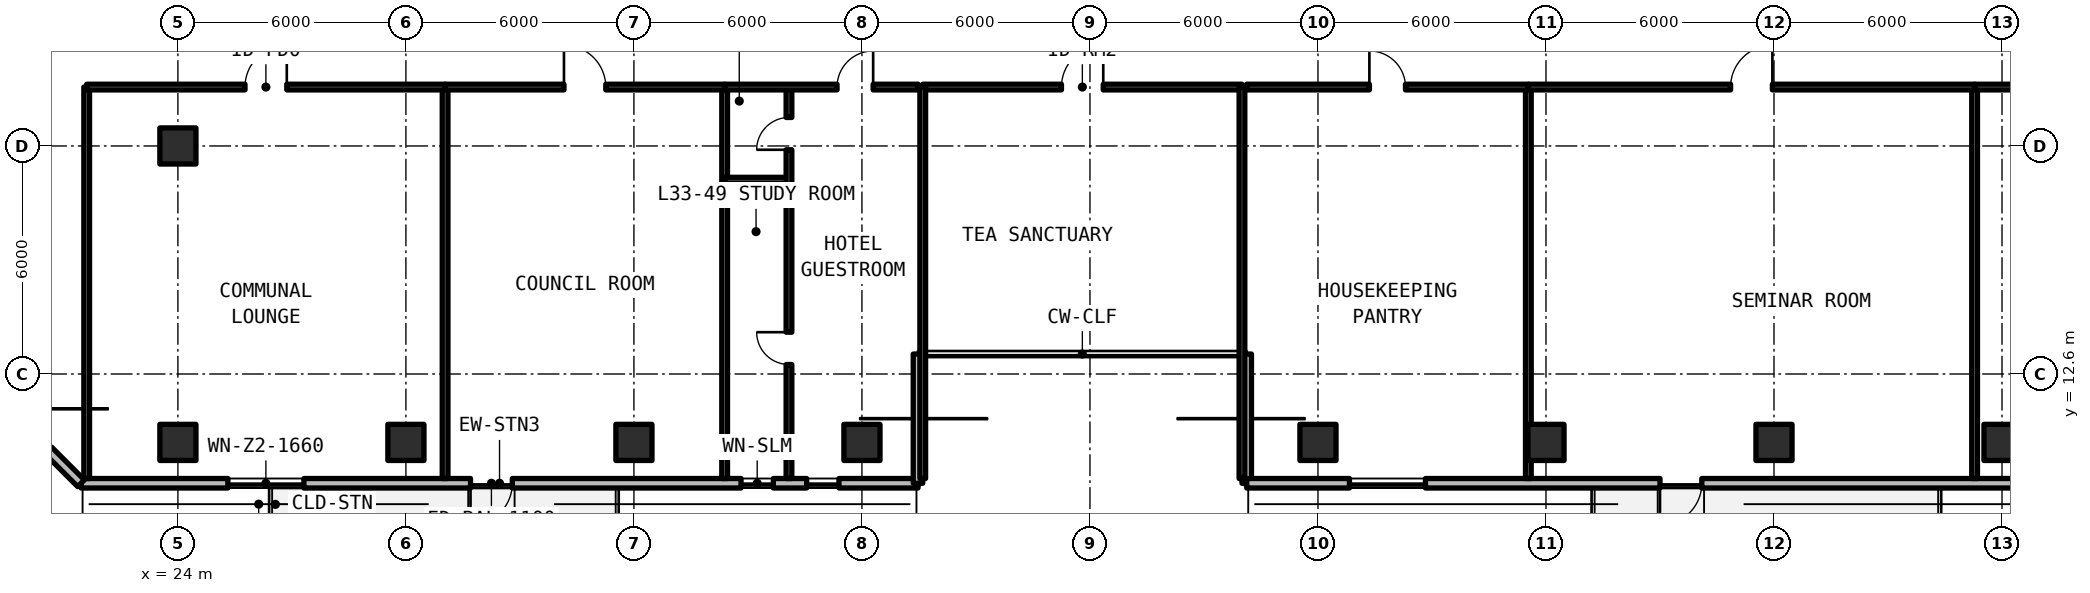
"""IFC4 building model, lengths in metres.
Left out: names, types, materials, properties, quantities, classifications, styles, units other than length and angle.
Written with IfcOpenShell. Run it as: python <this file> out.ifc"""

import sys

from ifc_helpers import new_model, si_unit, direction, frame, frame_2d, origin, origin_2d, place, context, subcontext, project, spatial, rectangle, extrude, element, fill, save


model = new_model("IFC4")
c1 = context("Model", 3, precision=1e-05, world=origin(), true_north=direction((0.0, 1.0)))
c2 = subcontext(c1, "Body", "Model", "MODEL_VIEW")
j1 = project(units=[si_unit("LENGTHUNIT", "METRE"), si_unit("PLANEANGLEUNIT", "RADIAN")], contexts=[c1])
p1 = place(None, origin())
s1 = spatial("IfcSite", under=j1, at=p1, CompositionType="ELEMENT")
p2 = place(p1, origin())
s2 = spatial("IfcBuilding", under=s1, at=p2, CompositionType="ELEMENT")
p3 = place(p2, frame((0.0, 0.0, 119.46)))
s3 = spatial("IfcBuildingStorey", under=s2, at=p3, CompositionType="ELEMENT", Elevation=119.46)
for number, where, z_axis, x_axis in (
    (1, (24.0, 18.6, 0.0), (0.0, 0.0, 1.0), (1.0, 0.0, 0.0)),
    (2, (24.0, 10.8, 0.0), (0.0, 0.0, 1.0), (1.0, 0.0, 0.0)),
    (3, (30.0, 10.8, 0.0), (0.0, 0.0, 1.0), (1.0, 0.0, 0.0)),
    (4, (36.0, 10.8, 0.0), (0.0, 0.0, 1.0), (1.0, 0.0, 0.0)),
    (5, (42.0, 10.8, 0.0), (0.0, 0.0, 1.0), (1.0, 0.0, 0.0)),
    (6, (54.0, 10.8, 0.0), (0.0, 0.0, 1.0), (1.0, 0.0, 0.0)),
    (7, (60.0, 10.8, 0.0), (0.0, 0.0, 1.0), (1.0, 0.0, 0.0)),
    (8, (66.0, 10.8, 0.0), (0.0, 0.0, 1.0), (1.0, 0.0, 0.0)),
    (9, (72.0, 10.8, 0.0), (0.0, 0.0, 1.0), (1.0, 0.0, 0.0)),
):
    element("IfcColumn", number, at=place(p3, frame(where, z_axis=z_axis, x_axis=x_axis)), inside=s3, PredefinedType="COLUMN", context=c2, shape_type="SweptSolid", body=[
        extrude(rectangle(XDim=0.95, YDim=0.95, at=origin_2d()), origin(), (0.0, 0.0, 1.0), 3.63),
    ])
p4 = place(p3, frame((21.452, 9.725, 0.0), z_axis=(0.0, 0.0, 1.0), x_axis=(1.0, 0.0, 0.0)))
e10 = element("IfcWall", 10, at=p4, inside=s3, PredefinedType="SOLIDWALL", context=c2, shape_type="SweptSolid", body=[
    extrude(rectangle(XDim=22.023, YDim=0.25, at=frame_2d((11.012, 0.0))), origin(), (0.0, 0.0, 1.0), 3.35),
])
p5 = place(p4, frame((10.248, 0.0, 0.0)))
e11 = element("IfcOpeningElement", 11, at=p5, cuts=e10, PredefinedType="OPENING", context=c2, shape_type="SweptSolid", body=[
    extrude(rectangle(XDim=1.1, YDim=2.15, at=frame_2d((0.55, 1.075))), frame((0.0, 0.135, 0.0), z_axis=(0.0, -1.0, 0.0), x_axis=(1.0, 0.0, 0.0)), (0.0, 0.0, 1.0), 0.27),
])
p6 = place(p4, frame((3.864, 0.0, 0.78)))
e12 = element("IfcOpeningElement", 12, at=p6, cuts=e10, PredefinedType="OPENING", context=c2, shape_type="SweptSolid", body=[
    extrude(rectangle(XDim=2.0, YDim=1.66, at=frame_2d((1.0, 0.83))), frame((0.0, 0.135, 0.0), z_axis=(0.0, -1.0, 0.0), x_axis=(1.0, 0.0, 0.0)), (0.0, 0.0, 1.0), 0.27),
])
p7 = place(p4, frame((17.367, 0.0, 0.78)))
e13 = element("IfcOpeningElement", 13, at=p7, cuts=e10, PredefinedType="OPENING", context=c2, shape_type="SweptSolid", body=[
    extrude(rectangle(XDim=0.85, YDim=1.65, at=frame_2d((0.425, 0.825))), frame((0.0, 0.135, 0.0), z_axis=(0.0, -1.0, 0.0), x_axis=(1.0, 0.0, 0.0)), (0.0, 0.0, 1.0), 0.27),
])
p8 = place(p4, frame((19.093, 0.0, 0.78)))
e14 = element("IfcOpeningElement", 14, at=p8, cuts=e10, PredefinedType="OPENING", context=c2, shape_type="SweptSolid", body=[
    extrude(rectangle(XDim=0.85, YDim=1.65, at=frame_2d((0.425, 0.825))), frame((0.0, 0.135, 0.0), z_axis=(0.0, -1.0, 0.0), x_axis=(1.0, 0.0, 0.0)), (0.0, 0.0, 1.0), 0.27),
])
for number, where, z_axis, x_axis in (
    (15, (43.475, 9.725, 0.0), (0.0, 0.0, 1.0), (0.0, 1.0, 0.0)),
    (16, (52.125, 13.125, 0.0), (0.0, 0.0, 1.0), (0.0, -1.0, 0.0)),
):
    element("IfcWall", number, at=place(p3, frame(where, z_axis=z_axis, x_axis=x_axis)), inside=s3, PredefinedType="SOLIDWALL", context=c2, shape_type="SweptSolid", body=[
        extrude(rectangle(XDim=3.4, YDim=0.25, at=frame_2d((1.7, 0.0))), origin(), (0.0, 0.0, 1.0), 3.35),
    ])
p9 = place(p3, frame((52.125, 9.725, 0.0), z_axis=(0.0, 0.0, 1.0), x_axis=(1.0, 0.0, 0.0)))
e17 = element("IfcWall", 17, at=p9, inside=s3, PredefinedType="SOLIDWALL", context=c2, shape_type="SweptSolid", body=[
    extrude(rectangle(XDim=44.023, YDim=0.25, at=frame_2d((22.012, 0.0))), origin(), (0.0, 0.0, 1.0), 3.35),
])
p10 = place(p9, frame((10.875, 0.0, 0.0)))
e18 = element("IfcOpeningElement", 18, at=p10, cuts=e17, PredefinedType="OPENING", context=c2, shape_type="SweptSolid", body=[
    extrude(rectangle(XDim=1.1, YDim=2.15, at=frame_2d((0.55, 1.075))), frame((0.0, 0.135, 0.0), z_axis=(0.0, -1.0, 0.0), x_axis=(1.0, 0.0, 0.0)), (0.0, 0.0, 1.0), 0.27),
])
p11 = place(p9, frame((22.975, 0.0, 0.0)))
e19 = element("IfcOpeningElement", 19, at=p11, cuts=e17, PredefinedType="OPENING", context=c2, shape_type="SweptSolid", body=[
    extrude(rectangle(XDim=1.1, YDim=2.15, at=frame_2d((0.55, 1.075))), frame((0.0, 0.135, 0.0), z_axis=(0.0, -1.0, 0.0), x_axis=(1.0, 0.0, 0.0)), (0.0, 0.0, 1.0), 0.27),
])
p12 = place(p9, frame((35.075, 0.0, 0.0)))
e20 = element("IfcOpeningElement", 20, at=p12, cuts=e17, PredefinedType="OPENING", context=c2, shape_type="SweptSolid", body=[
    extrude(rectangle(XDim=1.1, YDim=2.15, at=frame_2d((0.55, 1.075))), frame((0.0, 0.135, 0.0), z_axis=(0.0, -1.0, 0.0), x_axis=(1.0, 0.0, 0.0)), (0.0, 0.0, 1.0), 0.27),
])
p13 = place(p9, frame((2.703, 0.0, 0.78)))
e21 = element("IfcOpeningElement", 21, at=p13, cuts=e17, PredefinedType="OPENING", context=c2, shape_type="SweptSolid", body=[
    extrude(rectangle(XDim=2.0, YDim=1.66, at=frame_2d((1.0, 0.83))), frame((0.0, 0.135, 0.0), z_axis=(0.0, -1.0, 0.0), x_axis=(1.0, 0.0, 0.0)), (0.0, 0.0, 1.0), 0.27),
])
p14 = place(p9, frame((39.973, 0.0, 0.78)))
e22 = element("IfcOpeningElement", 22, at=p14, cuts=e17, PredefinedType="OPENING", context=c2, shape_type="SweptSolid", body=[
    extrude(rectangle(XDim=2.0, YDim=1.66, at=frame_2d((1.0, 0.83))), frame((0.0, 0.135, 0.0), z_axis=(0.0, -1.0, 0.0), x_axis=(1.0, 0.0, 0.0)), (0.0, 0.0, 1.0), 0.27),
])
p15 = place(p3, frame((17.325, 13.852, 0.0), z_axis=(0.0, 0.0, 1.0), x_axis=(0.707127696864, -0.70708586489, 0.0)))
e23 = element("IfcWall", 23, at=p15, inside=s3, PredefinedType="SOLIDWALL", context=c2, shape_type="SweptSolid", body=[
    extrude(rectangle(XDim=5.836, YDim=0.25, at=frame_2d((2.918, 0.0))), origin(), (0.0, 0.0, 1.0), 3.35),
])
p16 = place(p15, frame((1.218, 0.0, 0.78)))
e24 = element("IfcOpeningElement", 24, at=p16, cuts=e23, PredefinedType="OPENING", context=c2, shape_type="SweptSolid", body=[
    extrude(rectangle(XDim=3.4, YDim=1.66, at=frame_2d((1.7, 0.83))), frame((0.0, 0.135, 0.0), z_axis=(0.0, -1.0, 0.0), x_axis=(1.0, 0.0, 0.0)), (0.0, 0.0, 1.0), 0.27),
])
p17 = place(p3, frame((43.6, 20.15, 0.0), z_axis=(0.0, 0.0, 1.0), x_axis=(1.0, 0.0, 0.0)))
e25 = element("IfcWall", 25, at=p17, inside=s3, PredefinedType="SOLIDWALL", context=c2, shape_type="SweptSolid", body=[
    extrude(rectangle(XDim=8.4, YDim=0.15, at=frame_2d((4.2, 0.0))), origin(), (0.0, 0.0, 1.0), 2.57),
])
p18 = place(p17, frame((3.65, 0.0, 0.0)))
e26 = element("IfcOpeningElement", 26, at=p18, cuts=e25, PredefinedType="OPENING", context=c2, shape_type="SweptSolid", body=[
    extrude(rectangle(XDim=1.1, YDim=2.15, at=frame_2d((0.55, 1.075))), frame((0.0, 0.085, 0.0), z_axis=(0.0, -1.0, 0.0), x_axis=(1.0, 0.0, 0.0)), (0.0, 0.0, 1.0), 0.17),
])
for number, where, z_axis, x_axis in (
    (27, (43.6, 9.85, 0.0), (0.0, 0.0, 1.0), (0.0, 1.0, 0.0)),
    (28, (52.0, 9.85, 0.0), (0.0, 0.0, 1.0), (0.0, 1.0, 0.0)),
    (29, (21.6, 9.85, 0.0), (0.0, 0.0, 1.0), (0.0, 1.0, 0.0)),
    (30, (31.031, 9.85, 0.0), (0.0, 0.0, 1.0), (0.0, 1.0, 0.0)),
):
    element("IfcWall", number, at=place(p3, frame(where, z_axis=z_axis, x_axis=x_axis)), inside=s3, PredefinedType="SOLIDWALL", context=c2, shape_type="SweptSolid", body=[
        extrude(rectangle(XDim=10.3, YDim=0.15, at=frame_2d((5.15, 0.0))), origin(), (0.0, 0.0, 1.0), 2.57),
    ])
p19 = place(p3, frame((21.6, 20.15, 0.0), z_axis=(0.0, 0.0, 1.0), x_axis=(1.0, 0.0, 0.0)))
e31 = element("IfcWall", 31, at=p19, inside=s3, PredefinedType="SOLIDWALL", context=c2, shape_type="SweptSolid", body=[
    extrude(rectangle(XDim=9.431, YDim=0.15, at=frame_2d((4.715, 0.0))), origin(), (0.0, 0.0, 1.0), 2.57),
])
p20 = place(p19, frame((4.166, 0.0, 0.0)))
e32 = element("IfcOpeningElement", 32, at=p20, cuts=e31, PredefinedType="OPENING", context=c2, shape_type="SweptSolid", body=[
    extrude(rectangle(XDim=1.1, YDim=2.15, at=frame_2d((0.55, 1.075))), frame((0.0, 0.085, 0.0), z_axis=(0.0, -1.0, 0.0), x_axis=(1.0, 0.0, 0.0)), (0.0, 0.0, 1.0), 0.17),
])
p21 = place(p3, frame((38.387, 9.85, 0.0), z_axis=(0.0, 0.0, 1.0), x_axis=(0.0, 1.0, 0.0)))
e33 = element("IfcWall", 33, at=p21, inside=s3, PredefinedType="SOLIDWALL", context=c2, shape_type="SweptSolid", body=[
    extrude(rectangle(XDim=10.3, YDim=0.15, at=frame_2d((5.15, 0.0))), origin(), (0.0, 0.0, 1.0), 2.57),
])
p22 = place(p3, frame((31.031, 20.15, 0.0), z_axis=(0.0, 0.0, 1.0), x_axis=(1.0, 0.0, 0.0)))
e34 = element("IfcWall", 34, at=p22, inside=s3, PredefinedType="SOLIDWALL", context=c2, shape_type="SweptSolid", body=[
    extrude(rectangle(XDim=7.356, YDim=0.15, at=frame_2d((3.678, 0.0))), origin(), (0.0, 0.0, 1.0), 2.57),
])
p23 = place(p22, frame((3.128, 0.0, 0.0)))
e35 = element("IfcOpeningElement", 35, at=p23, cuts=e34, PredefinedType="OPENING", context=c2, shape_type="SweptSolid", body=[
    extrude(rectangle(XDim=1.1, YDim=2.15, at=frame_2d((0.55, 1.075))), frame((0.0, 0.085, 0.0), z_axis=(0.0, -1.0, 0.0), x_axis=(1.0, 0.0, 0.0)), (0.0, 0.0, 1.0), 0.17),
])
p24 = place(p3, frame((38.387, 17.7, 0.0), z_axis=(0.0, 0.0, 1.0), x_axis=(1.0, 0.0, 0.0)))
e36 = element("IfcWall", 36, at=p24, inside=s3, PredefinedType="PARTITIONING", context=c2, shape_type="SweptSolid", body=[
    extrude(rectangle(XDim=1.693, YDim=0.15, at=frame_2d((0.846, 0.0))), origin(), (0.0, 0.0, 1.0), 2.57),
])
p25 = place(p3, frame((40.08, 9.85, 0.0), z_axis=(0.0, 0.0, 1.0), x_axis=(0.0, 1.0, 0.0)))
e37 = element("IfcWall", 37, at=p25, inside=s3, PredefinedType="PARTITIONING", context=c2, shape_type="SweptSolid", body=[
    extrude(rectangle(XDim=10.3, YDim=0.15, at=frame_2d((5.15, 0.0))), origin(), (0.0, 0.0, 1.0), 2.57),
])
p26 = place(p25, frame((3.0, 0.0, 0.0)))
e38 = element("IfcOpeningElement", 38, at=p26, cuts=e37, PredefinedType="OPENING", context=c2, shape_type="SweptSolid", body=[
    extrude(rectangle(XDim=0.85, YDim=2.1, at=frame_2d((0.425, 1.05))), frame((0.0, 0.085, 0.0), z_axis=(0.0, -1.0, 0.0), x_axis=(1.0, 0.0, 0.0)), (0.0, 0.0, 1.0), 0.17),
])
p27 = place(p25, frame((8.65, 0.0, 0.0)))
e39 = element("IfcOpeningElement", 39, at=p27, cuts=e37, PredefinedType="OPENING", context=c2, shape_type="SweptSolid", body=[
    extrude(rectangle(XDim=0.85, YDim=2.1, at=frame_2d((0.425, 1.05))), frame((0.0, 0.085, 0.0), z_axis=(0.0, -1.0, 0.0), x_axis=(1.0, 0.0, 0.0)), (0.0, 0.0, 1.0), 0.17),
])
p28 = place(p3, frame((38.387, 20.15, 0.0), z_axis=(0.0, 0.0, 1.0), x_axis=(1.0, 0.0, 0.0)))
e40 = element("IfcWall", 40, at=p28, inside=s3, PredefinedType="SOLIDWALL", context=c2, shape_type="SweptSolid", body=[
    extrude(rectangle(XDim=5.093, YDim=0.15, at=frame_2d((2.546, 0.0))), origin(), (0.0, 0.0, 1.0), 2.57),
])
p29 = place(p28, frame((2.958, 0.0, 0.0)))
e41 = element("IfcOpeningElement", 41, at=p29, cuts=e40, PredefinedType="OPENING", context=c2, shape_type="SweptSolid", body=[
    extrude(rectangle(XDim=0.95, YDim=2.15, at=frame_2d((0.475, 1.075))), frame((0.0, 0.085, 0.0), z_axis=(0.0, -1.0, 0.0), x_axis=(1.0, 0.0, 0.0)), (0.0, 0.0, 1.0), 0.17),
])
p30 = place(p3, frame((59.536, 9.85, 0.0), z_axis=(0.0, 0.0, 1.0), x_axis=(0.0, 1.0, 0.0)))
e42 = element("IfcWall", 42, at=p30, inside=s3, PredefinedType="SOLIDWALL", context=c2, shape_type="SweptSolid", body=[
    extrude(rectangle(XDim=10.3, YDim=0.15, at=frame_2d((5.15, 0.0))), origin(), (0.0, 0.0, 1.0), 2.57),
])
p31 = place(p3, frame((52.12, 20.15, 0.0), z_axis=(0.0, 0.0, 1.0), x_axis=(1.0, 0.0, 0.0)))
e43 = element("IfcWall", 43, at=p31, inside=s3, PredefinedType="SOLIDWALL", context=c2, shape_type="SweptSolid", body=[
    extrude(rectangle(XDim=7.416, YDim=0.15, at=frame_2d((3.708, 0.0))), origin(), (0.0, 0.0, 1.0), 2.57),
])
p32 = place(p31, frame((3.233, 0.0, 0.0)))
e44 = element("IfcOpeningElement", 44, at=p32, cuts=e43, PredefinedType="OPENING", context=c2, shape_type="SweptSolid", body=[
    extrude(rectangle(XDim=0.95, YDim=2.15, at=frame_2d((0.475, 1.075))), frame((0.0, 0.085, 0.0), z_axis=(0.0, -1.0, 0.0), x_axis=(1.0, 0.0, 0.0)), (0.0, 0.0, 1.0), 0.17),
])
p33 = place(p3, frame((71.279, 9.85, 0.0), z_axis=(0.0, 0.0, 1.0), x_axis=(0.0, 1.0, 0.0)))
e45 = element("IfcWall", 45, at=p33, inside=s3, PredefinedType="SOLIDWALL", context=c2, shape_type="SweptSolid", body=[
    extrude(rectangle(XDim=10.3, YDim=0.15, at=frame_2d((5.15, 0.0))), origin(), (0.0, 0.0, 1.0), 2.57),
])
p34 = place(p3, frame((59.536, 20.15, 0.0), z_axis=(0.0, 0.0, 1.0), x_axis=(1.0, 0.0, 0.0)))
e46 = element("IfcWall", 46, at=p34, inside=s3, PredefinedType="SOLIDWALL", context=c2, shape_type="SweptSolid", body=[
    extrude(rectangle(XDim=11.742, YDim=0.15, at=frame_2d((5.871, 0.0))), origin(), (0.0, 0.0, 1.0), 2.57),
])
p35 = place(p34, frame((5.321, 0.0, 0.0)))
e47 = element("IfcOpeningElement", 47, at=p35, cuts=e46, PredefinedType="OPENING", context=c2, shape_type="SweptSolid", body=[
    extrude(rectangle(XDim=1.1, YDim=2.15, at=frame_2d((0.55, 1.075))), frame((0.0, 0.085, 0.0), z_axis=(0.0, -1.0, 0.0), x_axis=(1.0, 0.0, 0.0)), (0.0, 0.0, 1.0), 0.17),
])
p36 = place(p3, frame((71.279, 20.15, 0.0), z_axis=(0.0, 0.0, 1.0), x_axis=(1.0, 0.0, 0.0)))
e48 = element("IfcWall", 48, at=p36, inside=s3, PredefinedType="SOLIDWALL", context=c2, shape_type="SweptSolid", body=[
    extrude(rectangle(XDim=12.67, YDim=0.15, at=frame_2d((6.335, 0.0))), origin(), (0.0, 0.0, 1.0), 2.57),
])
p37 = place(p36, frame((5.785, 0.0, 0.0)))
e49 = element("IfcOpeningElement", 49, at=p37, cuts=e48, PredefinedType="OPENING", context=c2, shape_type="SweptSolid", body=[
    extrude(rectangle(XDim=1.1, YDim=2.15, at=frame_2d((0.55, 1.075))), frame((0.0, 0.085, 0.0), z_axis=(0.0, -1.0, 0.0), x_axis=(1.0, 0.0, 0.0)), (0.0, 0.0, 1.0), 0.17),
])
p38 = place(p5, frame((1.1, 0.0, 0.0), z_axis=(0.0, 0.0, 1.0), x_axis=(-1.0, 0.0, 0.0)))
e50 = element("IfcDoor", 50, at=p38, inside=s3, OperationType="SINGLE_SWING_RIGHT", PredefinedType="DOOR", context=c2, shape_type="SweptSolid", body=[
    extrude(rectangle(XDim=1.1, YDim=2.15, at=frame_2d((0.55, 1.075))), frame((0.0, 0.025, 0.0), z_axis=(0.0, -1.0, 0.0), x_axis=(1.0, 0.0, 0.0)), (0.0, 0.0, 1.0), 0.05),
])
fill(e11, e50)
p39 = place(p6, origin())
e51 = element("IfcWindow", 51, at=p39, inside=s3, PartitioningType="SINGLE_PANEL", PredefinedType="WINDOW", context=c2, shape_type="SweptSolid", body=[
    extrude(rectangle(XDim=2.0, YDim=1.66, at=frame_2d((1.0, 0.83))), frame((0.0, 0.03, 0.0), z_axis=(0.0, -1.0, 0.0), x_axis=(1.0, 0.0, 0.0)), (0.0, 0.0, 1.0), 0.06),
])
fill(e12, e51)
p40 = place(p7, origin())
e52 = element("IfcWindow", 52, at=p40, inside=s3, PartitioningType="SINGLE_PANEL", PredefinedType="WINDOW", context=c2, shape_type="SweptSolid", body=[
    extrude(rectangle(XDim=0.85, YDim=1.65, at=frame_2d((0.425, 0.825))), frame((0.0, 0.03, 0.0), z_axis=(0.0, -1.0, 0.0), x_axis=(1.0, 0.0, 0.0)), (0.0, 0.0, 1.0), 0.06),
])
fill(e13, e52)
p41 = place(p8, origin())
e53 = element("IfcWindow", 53, at=p41, inside=s3, PartitioningType="SINGLE_PANEL", PredefinedType="WINDOW", context=c2, shape_type="SweptSolid", body=[
    extrude(rectangle(XDim=0.85, YDim=1.65, at=frame_2d((0.425, 0.825))), frame((0.0, 0.03, 0.0), z_axis=(0.0, -1.0, 0.0), x_axis=(1.0, 0.0, 0.0)), (0.0, 0.0, 1.0), 0.06),
])
fill(e14, e53)
p42 = place(p10, frame((1.1, 0.0, 0.0), z_axis=(0.0, 0.0, 1.0), x_axis=(-1.0, 0.0, 0.0)))
e54 = element("IfcDoor", 54, at=p42, inside=s3, OperationType="SINGLE_SWING_LEFT", PredefinedType="DOOR", context=c2, shape_type="SweptSolid", body=[
    extrude(rectangle(XDim=1.1, YDim=2.15, at=frame_2d((0.55, 1.075))), frame((0.0, 0.025, 0.0), z_axis=(0.0, -1.0, 0.0), x_axis=(1.0, 0.0, 0.0)), (0.0, 0.0, 1.0), 0.05),
])
fill(e18, e54)
p43 = place(p13, origin())
e55 = element("IfcWindow", 55, at=p43, inside=s3, PartitioningType="SINGLE_PANEL", PredefinedType="WINDOW", context=c2, shape_type="SweptSolid", body=[
    extrude(rectangle(XDim=2.0, YDim=1.66, at=frame_2d((1.0, 0.83))), frame((0.0, 0.03, 0.0), z_axis=(0.0, -1.0, 0.0), x_axis=(1.0, 0.0, 0.0)), (0.0, 0.0, 1.0), 0.06),
])
fill(e21, e55)
p44 = place(p18, origin())
e56 = element("IfcDoor", 56, at=p44, inside=s3, OperationType="SINGLE_SWING_RIGHT", PredefinedType="DOOR", context=c2, shape_type="SweptSolid", body=[
    extrude(rectangle(XDim=1.1, YDim=2.15, at=frame_2d((0.55, 1.075))), frame((0.0, 0.025, 0.0), z_axis=(0.0, -1.0, 0.0), x_axis=(1.0, 0.0, 0.0)), (0.0, 0.0, 1.0), 0.05),
])
fill(e26, e56)
p45 = place(p20, origin())
e57 = element("IfcDoor", 57, at=p45, inside=s3, OperationType="SINGLE_SWING_RIGHT", PredefinedType="DOOR", context=c2, shape_type="SweptSolid", body=[
    extrude(rectangle(XDim=1.1, YDim=2.15, at=frame_2d((0.55, 1.075))), frame((0.0, 0.025, 0.0), z_axis=(0.0, -1.0, 0.0), x_axis=(1.0, 0.0, 0.0)), (0.0, 0.0, 1.0), 0.05),
])
fill(e32, e57)
p46 = place(p23, origin())
e58 = element("IfcDoor", 58, at=p46, inside=s3, OperationType="SINGLE_SWING_LEFT", PredefinedType="DOOR", context=c2, shape_type="SweptSolid", body=[
    extrude(rectangle(XDim=1.1, YDim=2.15, at=frame_2d((0.55, 1.075))), frame((0.0, 0.025, 0.0), z_axis=(0.0, -1.0, 0.0), x_axis=(1.0, 0.0, 0.0)), (0.0, 0.0, 1.0), 0.05),
])
fill(e35, e58)
p47 = place(p26, origin())
e59 = element("IfcDoor", 59, at=p47, inside=s3, OperationType="SINGLE_SWING_RIGHT", PredefinedType="DOOR", context=c2, shape_type="SweptSolid", body=[
    extrude(rectangle(XDim=0.85, YDim=2.1, at=frame_2d((0.425, 1.05))), frame((0.0, 0.025, 0.0), z_axis=(0.0, -1.0, 0.0), x_axis=(1.0, 0.0, 0.0)), (0.0, 0.0, 1.0), 0.05),
])
fill(e38, e59)
p48 = place(p27, origin())
e60 = element("IfcDoor", 60, at=p48, inside=s3, OperationType="SINGLE_SWING_LEFT", PredefinedType="DOOR", context=c2, shape_type="SweptSolid", body=[
    extrude(rectangle(XDim=0.85, YDim=2.1, at=frame_2d((0.425, 1.05))), frame((0.0, 0.025, 0.0), z_axis=(0.0, -1.0, 0.0), x_axis=(1.0, 0.0, 0.0)), (0.0, 0.0, 1.0), 0.05),
])
fill(e39, e60)
p49 = place(p29, origin())
e61 = element("IfcDoor", 61, at=p49, inside=s3, OperationType="SINGLE_SWING_RIGHT", PredefinedType="DOOR", context=c2, shape_type="SweptSolid", body=[
    extrude(rectangle(XDim=0.95, YDim=2.15, at=frame_2d((0.475, 1.075))), frame((0.0, 0.025, 0.0), z_axis=(0.0, -1.0, 0.0), x_axis=(1.0, 0.0, 0.0)), (0.0, 0.0, 1.0), 0.05),
])
fill(e41, e61)
p50 = place(p32, origin())
e62 = element("IfcDoor", 62, at=p50, inside=s3, OperationType="SINGLE_SWING_LEFT", PredefinedType="DOOR", context=c2, shape_type="SweptSolid", body=[
    extrude(rectangle(XDim=0.95, YDim=2.15, at=frame_2d((0.475, 1.075))), frame((0.0, 0.025, 0.0), z_axis=(0.0, -1.0, 0.0), x_axis=(1.0, 0.0, 0.0)), (0.0, 0.0, 1.0), 0.05),
])
fill(e44, e62)
p51 = place(p35, origin())
e63 = element("IfcDoor", 63, at=p51, inside=s3, OperationType="SINGLE_SWING_RIGHT", PredefinedType="DOOR", context=c2, shape_type="SweptSolid", body=[
    extrude(rectangle(XDim=1.1, YDim=2.15, at=frame_2d((0.55, 1.075))), frame((0.0, 0.025, 0.0), z_axis=(0.0, -1.0, 0.0), x_axis=(1.0, 0.0, 0.0)), (0.0, 0.0, 1.0), 0.05),
])
fill(e47, e63)
save(model, sys.argv[1])
